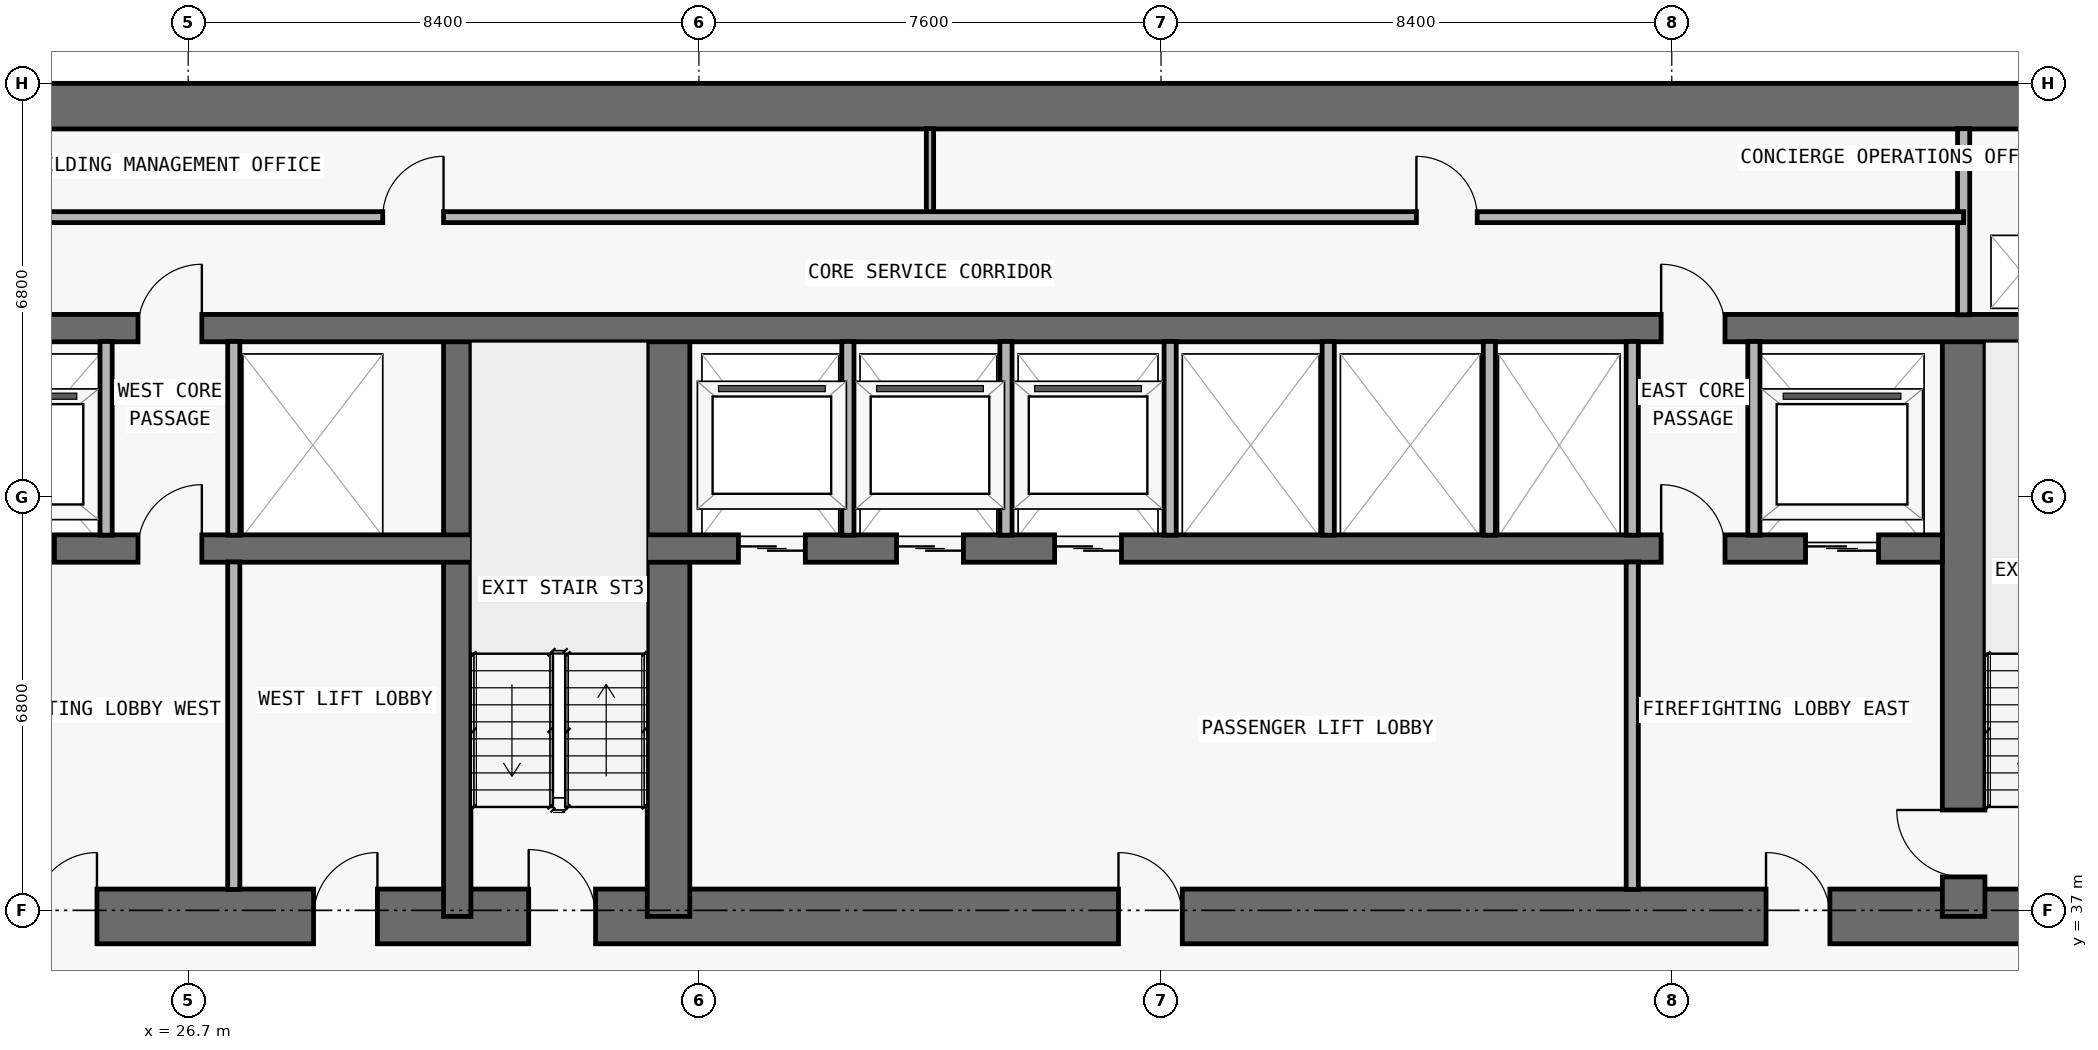
"""IFC4 building model, lengths in metres.
Left out: names, types, materials, properties, quantities, classifications, styles, units other than length and angle.
Written with IfcOpenShell. Run it as: python <this file> out.ifc"""

import sys

from ifc_helpers import new_model, si_unit, direction, frame, frame_2d, origin, place, context, subcontext, project, spatial, rectangle, extrude, element, fill, save


model = new_model("IFC4")
c1 = context("Model", 3, precision=1e-05, world=origin(), true_north=direction((0.0, 1.0)))
c2 = subcontext(c1, "Body", "Model", "MODEL_VIEW")
j1 = project(units=[si_unit("LENGTHUNIT", "METRE"), si_unit("PLANEANGLEUNIT", "RADIAN")], contexts=[c1])
p1 = place(None, origin())
s1 = spatial("IfcSite", under=j1, at=p1, CompositionType="ELEMENT")
p2 = place(p1, origin())
s2 = spatial("IfcBuilding", under=s1, at=p2, CompositionType="ELEMENT")
p3 = place(p2, frame((0.0, 0.0, 72.9)))
s3 = spatial("IfcBuildingStorey", under=s2, at=p3, CompositionType="ELEMENT", Elevation=72.9)
p4 = place(p3, frame((17.75, 36.9, 0.0), z_axis=(0.0, 0.0, 1.0), x_axis=(1.0, 0.0, 0.0)))
e1 = element("IfcWall", 1, at=p4, inside=s3, PredefinedType="SHEAR", context=c2, shape_type="SweptSolid", body=[
    extrude(rectangle(XDim=42.3, YDim=0.9, at=frame_2d((21.15, 0.0))), origin(), (0.0, 0.0, 1.0), 3.05),
])
p5 = place(p4, frame((14.55, 0.0, 0.0)))
e2 = element("IfcOpeningElement", 2, at=p5, cuts=e1, PredefinedType="OPENING", context=c2, shape_type="SweptSolid", body=[
    extrude(rectangle(XDim=1.1, YDim=2.15, at=frame_2d((0.55, 1.075))), frame((0.0, 0.46, 0.0), z_axis=(0.0, -1.0, 0.0), x_axis=(1.0, 0.0, 0.0)), (0.0, 0.0, 1.0), 0.92),
])
p6 = place(p4, frame((6.4, 0.0, 0.0)))
e3 = element("IfcOpeningElement", 3, at=p6, cuts=e1, PredefinedType="OPENING", context=c2, shape_type="SweptSolid", body=[
    extrude(rectangle(XDim=1.05, YDim=2.15, at=frame_2d((0.525, 1.075))), frame((0.0, 0.46, 0.0), z_axis=(0.0, -1.0, 0.0), x_axis=(1.0, 0.0, 0.0)), (0.0, 0.0, 1.0), 0.92),
])
p7 = place(p4, frame((34.9, 0.0, 0.0)))
e4 = element("IfcOpeningElement", 4, at=p7, cuts=e1, PredefinedType="OPENING", context=c2, shape_type="SweptSolid", body=[
    extrude(rectangle(XDim=1.05, YDim=2.15, at=frame_2d((0.525, 1.075))), frame((0.0, 0.46, 0.0), z_axis=(0.0, -1.0, 0.0), x_axis=(1.0, 0.0, 0.0)), (0.0, 0.0, 1.0), 0.92),
])
p8 = place(p4, frame((11.012, 0.0, 0.0)))
e5 = element("IfcOpeningElement", 5, at=p8, cuts=e1, PredefinedType="OPENING", context=c2, shape_type="SweptSolid", body=[
    extrude(rectangle(XDim=1.05, YDim=2.15, at=frame_2d((0.525, 1.075))), frame((0.0, 0.46, 0.0), z_axis=(0.0, -1.0, 0.0), x_axis=(1.0, 0.0, 0.0)), (0.0, 0.0, 1.0), 0.92),
])
p9 = place(p4, frame((24.25, 0.0, 0.0)))
e6 = element("IfcOpeningElement", 6, at=p9, cuts=e1, PredefinedType="OPENING", context=c2, shape_type="SweptSolid", body=[
    extrude(rectangle(XDim=1.05, YDim=2.15, at=frame_2d((0.525, 1.075))), frame((0.0, 0.46, 0.0), z_axis=(0.0, -1.0, 0.0), x_axis=(1.0, 0.0, 0.0)), (0.0, 0.0, 1.0), 0.92),
])
p10 = place(p3, frame((17.75, 50.225, 0.0), z_axis=(0.0, 0.0, 1.0), x_axis=(1.0, 0.0, 0.0)))
e7 = element("IfcWall", 7, at=p10, inside=s3, PredefinedType="SHEAR", context=c2, shape_type="SweptSolid", body=[
    extrude(rectangle(XDim=42.3, YDim=0.75, at=frame_2d((21.15, 0.0))), origin(), (0.0, 0.0, 1.0), 3.05),
])
p11 = place(p3, frame((55.9, 36.9, 0.0), z_axis=(0.0, 0.0, 1.0), x_axis=(0.0, 1.0, 0.0)))
e8 = element("IfcWall", 8, at=p11, inside=s3, PredefinedType="SHEAR", context=c2, shape_type="SweptSolid", body=[
    extrude(rectangle(XDim=9.675, YDim=0.7, at=frame_2d((4.837, 0.0))), origin(), (0.0, 0.0, 1.0), 3.05),
])
p12 = place(p11, frame((0.65, 0.0, 0.0)))
e9 = element("IfcOpeningElement", 9, at=p12, cuts=e8, PredefinedType="OPENING", context=c2, shape_type="SweptSolid", body=[
    extrude(rectangle(XDim=1.1, YDim=2.15, at=frame_2d((0.55, 1.075))), frame((0.0, 0.36, 0.0), z_axis=(0.0, -1.0, 0.0), x_axis=(1.0, 0.0, 0.0)), (0.0, 0.0, 1.0), 0.72),
])
p13 = place(p3, frame((31.125, 36.9, 0.0), z_axis=(0.0, 0.0, 1.0), x_axis=(0.0, 1.0, 0.0)))
e10 = element("IfcWall", 10, at=p13, inside=s3, PredefinedType="SHEAR", context=c2, shape_type="SweptSolid", body=[
    extrude(rectangle(XDim=9.675, YDim=0.45, at=frame_2d((4.837, 0.0))), origin(), (0.0, 0.0, 1.0), 3.05),
])
p14 = place(p3, frame((34.6, 36.9, 0.0), z_axis=(0.0, 0.0, 1.0), x_axis=(0.0, 1.0, 0.0)))
e11 = element("IfcWall", 11, at=p14, inside=s3, PredefinedType="SHEAR", context=c2, shape_type="SweptSolid", body=[
    extrude(rectangle(XDim=9.675, YDim=0.7, at=frame_2d((4.837, 0.0))), origin(), (0.0, 0.0, 1.0), 3.05),
])
p15 = place(p3, frame((22.25, 42.95, 0.0), z_axis=(0.0, 0.0, 1.0), x_axis=(1.0, 0.0, 0.0)))
e12 = element("IfcWall", 12, at=p15, inside=s3, PredefinedType="SHEAR", context=c2, shape_type="SweptSolid", body=[
    extrude(rectangle(XDim=33.3, YDim=0.45, at=frame_2d((16.65, 0.0))), origin(), (0.0, 0.0, 1.0), 3.05),
])
p16 = place(p15, frame((1.05, 0.0, 0.0)))
e13 = element("IfcOpeningElement", 13, at=p16, cuts=e12, PredefinedType="OPENING", context=c2, shape_type="SweptSolid", body=[
    extrude(rectangle(XDim=1.2, YDim=2.2, at=frame_2d((0.6, 1.1))), frame((0.0, 0.235, 0.0), z_axis=(0.0, -1.0, 0.0), x_axis=(1.0, 0.0, 0.0)), (0.0, 0.0, 1.0), 0.47),
])
p17 = place(p15, frame((31.05, 0.0, 0.0)))
e14 = element("IfcOpeningElement", 14, at=p17, cuts=e12, PredefinedType="OPENING", context=c2, shape_type="SweptSolid", body=[
    extrude(rectangle(XDim=1.2, YDim=2.2, at=frame_2d((0.6, 1.1))), frame((0.0, 0.235, 0.0), z_axis=(0.0, -1.0, 0.0), x_axis=(1.0, 0.0, 0.0)), (0.0, 0.0, 1.0), 0.47),
])
p18 = place(p15, frame((13.5, 0.0, 0.0)))
e15 = element("IfcOpeningElement", 15, at=p18, cuts=e12, PredefinedType="OPENING", context=c2, shape_type="SweptSolid", body=[
    extrude(rectangle(XDim=1.1, YDim=2.2, at=frame_2d((0.55, 1.1))), frame((0.0, 0.235, 0.0), z_axis=(0.0, -1.0, 0.0), x_axis=(1.0, 0.0, 0.0)), (0.0, 0.0, 1.0), 0.47),
])
p19 = place(p15, frame((16.1, 0.0, 0.0)))
e16 = element("IfcOpeningElement", 16, at=p19, cuts=e12, PredefinedType="OPENING", context=c2, shape_type="SweptSolid", body=[
    extrude(rectangle(XDim=1.1, YDim=2.2, at=frame_2d((0.55, 1.1))), frame((0.0, 0.235, 0.0), z_axis=(0.0, -1.0, 0.0), x_axis=(1.0, 0.0, 0.0)), (0.0, 0.0, 1.0), 0.47),
])
p20 = place(p15, frame((18.7, 0.0, 0.0)))
e17 = element("IfcOpeningElement", 17, at=p20, cuts=e12, PredefinedType="OPENING", context=c2, shape_type="SweptSolid", body=[
    extrude(rectangle(XDim=1.1, YDim=2.2, at=frame_2d((0.55, 1.1))), frame((0.0, 0.235, 0.0), z_axis=(0.0, -1.0, 0.0), x_axis=(1.0, 0.0, 0.0)), (0.0, 0.0, 1.0), 0.47),
])
p21 = place(p15, frame((3.625, 0.0, 0.0)))
e18 = element("IfcOpeningElement", 18, at=p21, cuts=e12, PredefinedType="OPENING", context=c2, shape_type="SweptSolid", body=[
    extrude(rectangle(XDim=1.05, YDim=2.15, at=frame_2d((0.525, 1.075))), frame((0.0, 0.235, 0.0), z_axis=(0.0, -1.0, 0.0), x_axis=(1.0, 0.0, 0.0)), (0.0, 0.0, 1.0), 0.47),
])
p22 = place(p15, frame((28.675, 0.0, 0.0)))
e19 = element("IfcOpeningElement", 19, at=p22, cuts=e12, PredefinedType="OPENING", context=c2, shape_type="SweptSolid", body=[
    extrude(rectangle(XDim=1.05, YDim=2.15, at=frame_2d((0.525, 1.075))), frame((0.0, 0.235, 0.0), z_axis=(0.0, -1.0, 0.0), x_axis=(1.0, 0.0, 0.0)), (0.0, 0.0, 1.0), 0.47),
])
p23 = place(p3, frame((18.2, 46.575, 0.0), z_axis=(0.0, 0.0, 1.0), x_axis=(1.0, 0.0, 0.0)))
e20 = element("IfcWall", 20, at=p23, inside=s3, PredefinedType="SHEAR", context=c2, shape_type="SweptSolid", body=[
    extrude(rectangle(XDim=41.4, YDim=0.45, at=frame_2d((20.7, 0.0))), origin(), (0.0, 0.0, 1.0), 3.05),
])
p24 = place(p23, frame((7.675, 0.0, 0.0)))
e21 = element("IfcOpeningElement", 21, at=p24, cuts=e20, PredefinedType="OPENING", context=c2, shape_type="SweptSolid", body=[
    extrude(rectangle(XDim=1.05, YDim=2.15, at=frame_2d((0.525, 1.075))), frame((0.0, 0.235, 0.0), z_axis=(0.0, -1.0, 0.0), x_axis=(1.0, 0.0, 0.0)), (0.0, 0.0, 1.0), 0.47),
])
p25 = place(p23, frame((32.725, 0.0, 0.0)))
e22 = element("IfcOpeningElement", 22, at=p25, cuts=e20, PredefinedType="OPENING", context=c2, shape_type="SweptSolid", body=[
    extrude(rectangle(XDim=1.05, YDim=2.15, at=frame_2d((0.525, 1.075))), frame((0.0, 0.235, 0.0), z_axis=(0.0, -1.0, 0.0), x_axis=(1.0, 0.0, 0.0)), (0.0, 0.0, 1.0), 0.47),
])
p26 = place(p3, frame((25.35, 43.17, 0.0), z_axis=(0.0, 0.0, 1.0), x_axis=(0.0, 1.0, 0.0)))
e23 = element("IfcWall", 23, at=p26, inside=s3, PredefinedType="PARTITIONING", context=c2, shape_type="SweptSolid", body=[
    extrude(rectangle(XDim=3.185, YDim=0.2, at=frame_2d((1.593, 0.0))), origin(), (0.0, 0.0, 1.0), 3.05),
])
p27 = place(p3, frame((27.45, 37.345, 0.0), z_axis=(0.0, 0.0, 1.0), x_axis=(0.0, 1.0, 0.0)))
e24 = element("IfcWall", 24, at=p27, inside=s3, PredefinedType="PARTITIONING", context=c2, shape_type="SweptSolid", body=[
    extrude(rectangle(XDim=5.385, YDim=0.2, at=frame_2d((2.692, 0.0))), origin(), (0.0, 0.0, 1.0), 3.05),
])
for number, where, z_axis, x_axis in (
    (25, (27.45, 43.17, 0.0), (0.0, 0.0, 1.0), (0.0, 1.0, 0.0)),
    (26, (37.55, 43.17, 0.0), (0.0, 0.0, 1.0), (0.0, 1.0, 0.0)),
):
    element("IfcWall", number, at=place(p3, frame(where, z_axis=z_axis, x_axis=x_axis)), inside=s3, PredefinedType="PARTITIONING", context=c2, shape_type="SweptSolid", body=[
        extrude(rectangle(XDim=3.185, YDim=0.2, at=frame_2d((1.593, 0.0))), origin(), (0.0, 0.0, 1.0), 3.05),
    ])
p28 = place(p3, frame((38.9, 48.4, 0.0), z_axis=(0.0, 0.0, 1.0), x_axis=(0.0, 1.0, 0.0)))
e27 = element("IfcWall", 27, at=p28, inside=s3, PredefinedType="PARTITIONING", context=c2, shape_type="SweptSolid", body=[
    extrude(rectangle(XDim=1.455, YDim=0.12, at=frame_2d((0.728, 0.0))), origin(), (0.0, 0.0, 1.0), 3.05),
])
for number, where, z_axis, x_axis in (
    (28, (40.15, 43.17, 0.0), (0.0, 0.0, 1.0), (0.0, 1.0, 0.0)),
    (29, (42.85, 43.17, 0.0), (0.0, 0.0, 1.0), (0.0, 1.0, 0.0)),
    (30, (45.45, 43.17, 0.0), (0.0, 0.0, 1.0), (0.0, 1.0, 0.0)),
    (31, (48.1, 43.17, 0.0), (0.0, 0.0, 1.0), (0.0, 1.0, 0.0)),
):
    element("IfcWall", number, at=place(p3, frame(where, z_axis=z_axis, x_axis=x_axis)), inside=s3, PredefinedType="PARTITIONING", context=c2, shape_type="SweptSolid", body=[
        extrude(rectangle(XDim=3.185, YDim=0.2, at=frame_2d((1.593, 0.0))), origin(), (0.0, 0.0, 1.0), 3.05),
    ])
p29 = place(p3, frame((50.45, 37.345, 0.0), z_axis=(0.0, 0.0, 1.0), x_axis=(0.0, 1.0, 0.0)))
e32 = element("IfcWall", 32, at=p29, inside=s3, PredefinedType="PARTITIONING", context=c2, shape_type="SweptSolid", body=[
    extrude(rectangle(XDim=5.385, YDim=0.2, at=frame_2d((2.692, 0.0))), origin(), (0.0, 0.0, 1.0), 3.05),
])
for number, where, z_axis, x_axis in (
    (33, (50.45, 43.17, 0.0), (0.0, 0.0, 1.0), (0.0, 1.0, 0.0)),
    (34, (52.45, 43.17, 0.0), (0.0, 0.0, 1.0), (0.0, 1.0, 0.0)),
):
    element("IfcWall", number, at=place(p3, frame(where, z_axis=z_axis, x_axis=x_axis)), inside=s3, PredefinedType="PARTITIONING", context=c2, shape_type="SweptSolid", body=[
        extrude(rectangle(XDim=3.185, YDim=0.2, at=frame_2d((1.593, 0.0))), origin(), (0.0, 0.0, 1.0), 3.05),
    ])
p30 = place(p3, frame((55.9, 46.795, 0.0), z_axis=(0.0, 0.0, 1.0), x_axis=(0.0, 1.0, 0.0)))
e35 = element("IfcWall", 35, at=p30, inside=s3, PredefinedType="PARTITIONING", context=c2, shape_type="SweptSolid", body=[
    extrude(rectangle(XDim=3.06, YDim=0.2, at=frame_2d((1.53, 0.0))), origin(), (0.0, 0.0, 1.0), 3.05),
])
p31 = place(p3, frame((21.9, 48.4, 0.0), z_axis=(0.0, 0.0, 1.0), x_axis=(1.0, 0.0, 0.0)))
e36 = element("IfcWall", 36, at=p31, inside=s3, PredefinedType="PARTITIONING", context=c2, shape_type="SweptSolid", body=[
    extrude(rectangle(XDim=34.0, YDim=0.18, at=frame_2d((17.0, 0.0))), origin(), (0.0, 0.0, 1.0), 3.05),
])
p32 = place(p31, frame((8.0, 0.0, 0.0)))
e37 = element("IfcOpeningElement", 37, at=p32, cuts=e36, PredefinedType="OPENING", context=c2, shape_type="SweptSolid", body=[
    extrude(rectangle(XDim=1.0, YDim=2.2, at=frame_2d((0.5, 1.1))), frame((0.0, 0.1, 0.0), z_axis=(0.0, -1.0, 0.0), x_axis=(1.0, 0.0, 0.0)), (0.0, 0.0, 1.0), 0.2),
])
p33 = place(p31, frame((25.0, 0.0, 0.0)))
e38 = element("IfcOpeningElement", 38, at=p33, cuts=e36, PredefinedType="OPENING", context=c2, shape_type="SweptSolid", body=[
    extrude(rectangle(XDim=1.0, YDim=2.2, at=frame_2d((0.5, 1.1))), frame((0.0, 0.1, 0.0), z_axis=(0.0, -1.0, 0.0), x_axis=(1.0, 0.0, 0.0)), (0.0, 0.0, 1.0), 0.2),
])
p34 = place(p16, origin())
e39 = element("IfcDoor", 39, at=p34, inside=s3, OperationType="DOUBLE_DOOR_SLIDING", PredefinedType="DOOR", context=c2, shape_type="SweptSolid", body=[
    extrude(rectangle(XDim=1.2, YDim=2.2, at=frame_2d((0.6, 1.1))), frame((0.0, 0.025, 0.0), z_axis=(0.0, -1.0, 0.0), x_axis=(1.0, 0.0, 0.0)), (0.0, 0.0, 1.0), 0.05),
])
fill(e13, e39)
p35 = place(p17, origin())
e40 = element("IfcDoor", 40, at=p35, inside=s3, OperationType="DOUBLE_DOOR_SLIDING", PredefinedType="DOOR", context=c2, shape_type="SweptSolid", body=[
    extrude(rectangle(XDim=1.2, YDim=2.2, at=frame_2d((0.6, 1.1))), frame((0.0, 0.025, 0.0), z_axis=(0.0, -1.0, 0.0), x_axis=(1.0, 0.0, 0.0)), (0.0, 0.0, 1.0), 0.05),
])
fill(e14, e40)
p36 = place(p18, origin())
e41 = element("IfcDoor", 41, at=p36, inside=s3, OperationType="DOUBLE_DOOR_SLIDING", PredefinedType="DOOR", context=c2, shape_type="SweptSolid", body=[
    extrude(rectangle(XDim=1.1, YDim=2.2, at=frame_2d((0.55, 1.1))), frame((0.0, 0.025, 0.0), z_axis=(0.0, -1.0, 0.0), x_axis=(1.0, 0.0, 0.0)), (0.0, 0.0, 1.0), 0.05),
])
fill(e15, e41)
p37 = place(p19, origin())
e42 = element("IfcDoor", 42, at=p37, inside=s3, OperationType="DOUBLE_DOOR_SLIDING", PredefinedType="DOOR", context=c2, shape_type="SweptSolid", body=[
    extrude(rectangle(XDim=1.1, YDim=2.2, at=frame_2d((0.55, 1.1))), frame((0.0, 0.025, 0.0), z_axis=(0.0, -1.0, 0.0), x_axis=(1.0, 0.0, 0.0)), (0.0, 0.0, 1.0), 0.05),
])
fill(e16, e42)
p38 = place(p20, origin())
e43 = element("IfcDoor", 43, at=p38, inside=s3, OperationType="DOUBLE_DOOR_SLIDING", PredefinedType="DOOR", context=c2, shape_type="SweptSolid", body=[
    extrude(rectangle(XDim=1.1, YDim=2.2, at=frame_2d((0.55, 1.1))), frame((0.0, 0.025, 0.0), z_axis=(0.0, -1.0, 0.0), x_axis=(1.0, 0.0, 0.0)), (0.0, 0.0, 1.0), 0.05),
])
fill(e17, e43)
p39 = place(p5, origin())
e44 = element("IfcDoor", 44, at=p39, inside=s3, OperationType="SINGLE_SWING_LEFT", PredefinedType="DOOR", context=c2, shape_type="SweptSolid", body=[
    extrude(rectangle(XDim=1.1, YDim=2.15, at=frame_2d((0.55, 1.075))), frame((0.0, 0.025, 0.0), z_axis=(0.0, -1.0, 0.0), x_axis=(1.0, 0.0, 0.0)), (0.0, 0.0, 1.0), 0.05),
])
fill(e2, e44)
p40 = place(p6, origin())
e45 = element("IfcDoor", 45, at=p40, inside=s3, OperationType="SINGLE_SWING_RIGHT", PredefinedType="DOOR", context=c2, shape_type="SweptSolid", body=[
    extrude(rectangle(XDim=1.05, YDim=2.15, at=frame_2d((0.525, 1.075))), frame((0.0, 0.025, 0.0), z_axis=(0.0, -1.0, 0.0), x_axis=(1.0, 0.0, 0.0)), (0.0, 0.0, 1.0), 0.05),
])
fill(e3, e45)
p41 = place(p21, origin())
e46 = element("IfcDoor", 46, at=p41, inside=s3, OperationType="SINGLE_SWING_RIGHT", PredefinedType="DOOR", context=c2, shape_type="SweptSolid", body=[
    extrude(rectangle(XDim=1.05, YDim=2.15, at=frame_2d((0.525, 1.075))), frame((0.0, 0.025, 0.0), z_axis=(0.0, -1.0, 0.0), x_axis=(1.0, 0.0, 0.0)), (0.0, 0.0, 1.0), 0.05),
])
fill(e18, e46)
p42 = place(p7, origin())
e47 = element("IfcDoor", 47, at=p42, inside=s3, OperationType="SINGLE_SWING_LEFT", PredefinedType="DOOR", context=c2, shape_type="SweptSolid", body=[
    extrude(rectangle(XDim=1.05, YDim=2.15, at=frame_2d((0.525, 1.075))), frame((0.0, 0.025, 0.0), z_axis=(0.0, -1.0, 0.0), x_axis=(1.0, 0.0, 0.0)), (0.0, 0.0, 1.0), 0.05),
])
fill(e4, e47)
p43 = place(p12, origin())
e48 = element("IfcDoor", 48, at=p43, inside=s3, OperationType="SINGLE_SWING_RIGHT", PredefinedType="DOOR", context=c2, shape_type="SweptSolid", body=[
    extrude(rectangle(XDim=1.1, YDim=2.15, at=frame_2d((0.55, 1.075))), frame((0.0, 0.025, 0.0), z_axis=(0.0, -1.0, 0.0), x_axis=(1.0, 0.0, 0.0)), (0.0, 0.0, 1.0), 0.05),
])
fill(e9, e48)
p44 = place(p22, origin())
e49 = element("IfcDoor", 49, at=p44, inside=s3, OperationType="SINGLE_SWING_LEFT", PredefinedType="DOOR", context=c2, shape_type="SweptSolid", body=[
    extrude(rectangle(XDim=1.05, YDim=2.15, at=frame_2d((0.525, 1.075))), frame((0.0, 0.025, 0.0), z_axis=(0.0, -1.0, 0.0), x_axis=(1.0, 0.0, 0.0)), (0.0, 0.0, 1.0), 0.05),
])
fill(e19, e49)
p45 = place(p8, origin())
e50 = element("IfcDoor", 50, at=p45, inside=s3, OperationType="SINGLE_SWING_RIGHT", PredefinedType="DOOR", context=c2, shape_type="SweptSolid", body=[
    extrude(rectangle(XDim=1.05, YDim=2.15, at=frame_2d((0.525, 1.075))), frame((0.0, 0.025, 0.0), z_axis=(0.0, -1.0, 0.0), x_axis=(1.0, 0.0, 0.0)), (0.0, 0.0, 1.0), 0.05),
])
fill(e5, e50)
p46 = place(p9, origin())
e51 = element("IfcDoor", 51, at=p46, inside=s3, OperationType="SINGLE_SWING_LEFT", PredefinedType="DOOR", context=c2, shape_type="SweptSolid", body=[
    extrude(rectangle(XDim=1.05, YDim=2.15, at=frame_2d((0.525, 1.075))), frame((0.0, 0.025, 0.0), z_axis=(0.0, -1.0, 0.0), x_axis=(1.0, 0.0, 0.0)), (0.0, 0.0, 1.0), 0.05),
])
fill(e6, e51)
p47 = place(p24, origin())
e52 = element("IfcDoor", 52, at=p47, inside=s3, OperationType="SINGLE_SWING_RIGHT", PredefinedType="DOOR", context=c2, shape_type="SweptSolid", body=[
    extrude(rectangle(XDim=1.05, YDim=2.15, at=frame_2d((0.525, 1.075))), frame((0.0, 0.025, 0.0), z_axis=(0.0, -1.0, 0.0), x_axis=(1.0, 0.0, 0.0)), (0.0, 0.0, 1.0), 0.05),
])
fill(e21, e52)
p48 = place(p25, origin())
e53 = element("IfcDoor", 53, at=p48, inside=s3, OperationType="SINGLE_SWING_LEFT", PredefinedType="DOOR", context=c2, shape_type="SweptSolid", body=[
    extrude(rectangle(XDim=1.05, YDim=2.15, at=frame_2d((0.525, 1.075))), frame((0.0, 0.025, 0.0), z_axis=(0.0, -1.0, 0.0), x_axis=(1.0, 0.0, 0.0)), (0.0, 0.0, 1.0), 0.05),
])
fill(e22, e53)
p49 = place(p32, origin())
e54 = element("IfcDoor", 54, at=p49, inside=s3, OperationType="SINGLE_SWING_RIGHT", PredefinedType="DOOR", context=c2, shape_type="SweptSolid", body=[
    extrude(rectangle(XDim=1.0, YDim=2.2, at=frame_2d((0.5, 1.1))), frame((0.0, 0.025, 0.0), z_axis=(0.0, -1.0, 0.0), x_axis=(1.0, 0.0, 0.0)), (0.0, 0.0, 1.0), 0.05),
])
fill(e37, e54)
p50 = place(p33, origin())
e55 = element("IfcDoor", 55, at=p50, inside=s3, OperationType="SINGLE_SWING_LEFT", PredefinedType="DOOR", context=c2, shape_type="SweptSolid", body=[
    extrude(rectangle(XDim=1.0, YDim=2.2, at=frame_2d((0.5, 1.1))), frame((0.0, 0.025, 0.0), z_axis=(0.0, -1.0, 0.0), x_axis=(1.0, 0.0, 0.0)), (0.0, 0.0, 1.0), 0.05),
])
fill(e38, e55)
save(model, sys.argv[1])
